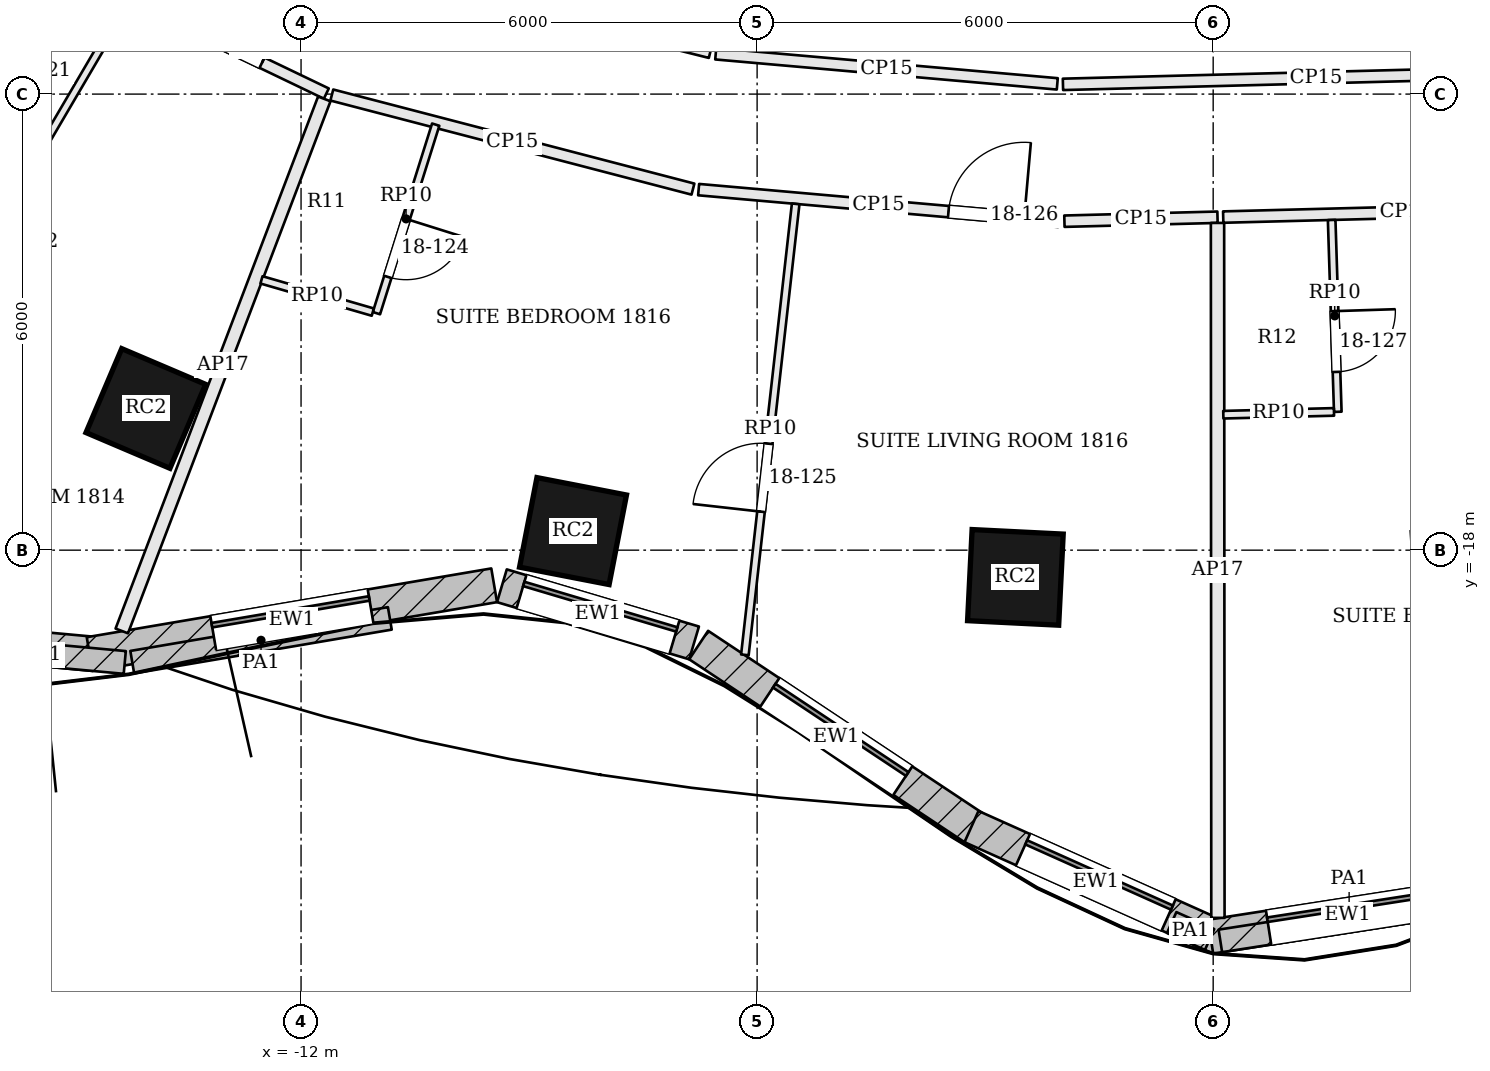
"""IFC4 building model, lengths in metres.
Left out: names, types, materials, properties, quantities, classifications, styles, units other than length and angle.
Written with IfcOpenShell. Run it as: python <this file> out.ifc"""

import sys

from ifc_helpers import new_model, si_unit, direction, frame, frame_2d, origin, origin_2d, place, context, subcontext, project, spatial, rectangle, extrude, element, fill, save


model = new_model("IFC4")
c1 = context("Model", 3, precision=1e-05, world=origin(), true_north=direction((0.0, 1.0)))
c2 = subcontext(c1, "Body", "Model", "MODEL_VIEW")
j1 = project(units=[si_unit("LENGTHUNIT", "METRE"), si_unit("PLANEANGLEUNIT", "RADIAN")], contexts=[c1])
p1 = place(None, origin())
s1 = spatial("IfcSite", under=j1, at=p1, CompositionType="ELEMENT")
p2 = place(p1, origin())
s2 = spatial("IfcBuilding", under=s1, at=p2, CompositionType="ELEMENT")
p3 = place(p2, frame((0.0, 0.0, 81.6)))
s3 = spatial("IfcBuildingStorey", under=s2, at=p3, CompositionType="ELEMENT", Elevation=81.6)
for number, where, z_axis, x_axis in (
    (1, (-14.042, -16.136, -0.7), (0.0, 0.0, 1.0), (0.92, -0.392, 0.0)),
    (2, (-8.422, -17.749, -0.7), (0.0, 0.0, 1.0), (0.982, -0.191, 0.0)),
    (3, (-2.602, -18.358, -0.7), (0.0, 0.0, 1.0), (0.999, -0.05, 0.0)),
):
    element("IfcColumn", number, at=place(p3, frame(where, z_axis=z_axis, x_axis=x_axis)), inside=s3, PredefinedType="COLUMN", context=c2, shape_type="SweptSolid", body=[
        extrude(rectangle(XDim=1.2, YDim=1.2, at=origin_2d()), origin(), (0.0, 0.0, 1.0), 4.3),
    ])
p4 = place(p3, frame((-19.159, -18.956, 0.0), z_axis=(0.0, 0.0, 1.0), x_axis=(0.995777399421, -0.091800712424, 0.0)))
e4 = element("IfcWall", 4, at=p4, inside=s3, PredefinedType="SOLIDWALL", context=c2, shape_type="SweptSolid", body=[
    extrude(rectangle(XDim=4.455, YDim=0.45, at=frame_2d((2.227, 0.0))), origin(), (0.0, 0.0, 1.0), 3.4),
])
p5 = place(p4, frame((1.177, 0.0, 0.9)))
e5 = element("IfcOpeningElement", 5, at=p5, cuts=e4, PredefinedType="OPENING", context=c2, shape_type="SweptSolid", body=[
    extrude(rectangle(XDim=2.1, YDim=2.0, at=frame_2d((1.05, 1.0))), frame((0.0, 0.235, 0.0), z_axis=(0.0, -1.0, 0.0), x_axis=(1.0, 0.0, 0.0)), (0.0, 0.0, 1.0), 0.47),
])
p6 = place(p3, frame((-14.782, -19.367, 0.0), z_axis=(0.0, 0.0, 1.0), x_axis=(0.98585584667, 0.167595493934, 0.0)))
e6 = element("IfcWall", 6, at=p6, inside=s3, PredefinedType="SOLIDWALL", context=c2, shape_type="SweptSolid", body=[
    extrude(rectangle(XDim=5.399, YDim=0.45, at=frame_2d((2.699, 0.0))), origin(), (0.0, 0.0, 1.0), 3.4),
])
p7 = place(p6, frame((1.649, 0.0, 0.9)))
e7 = element("IfcOpeningElement", 7, at=p7, cuts=e6, PredefinedType="OPENING", context=c2, shape_type="SweptSolid", body=[
    extrude(rectangle(XDim=2.1, YDim=2.0, at=frame_2d((1.05, 1.0))), frame((0.0, 0.235, 0.0), z_axis=(0.0, -1.0, 0.0), x_axis=(1.0, 0.0, 0.0)), (0.0, 0.0, 1.0), 0.47),
])
p8 = place(p3, frame((-9.357, -18.469, 0.0), z_axis=(0.0, 0.0, 1.0), x_axis=(0.958524054629, -0.285011643091, 0.0)))
e8 = element("IfcWall", 8, at=p8, inside=s3, PredefinedType="SOLIDWALL", context=c2, shape_type="SweptSolid", body=[
    extrude(rectangle(XDim=2.637, YDim=0.45, at=frame_2d((1.319, 0.0))), origin(), (0.0, 0.0, 1.0), 3.4),
])
p9 = place(p8, frame((0.269, 0.0, 0.9)))
e9 = element("IfcOpeningElement", 9, at=p9, cuts=e8, PredefinedType="OPENING", context=c2, shape_type="SweptSolid", body=[
    extrude(rectangle(XDim=2.1, YDim=2.0, at=frame_2d((1.05, 1.0))), frame((0.0, 0.235, 0.0), z_axis=(0.0, -1.0, 0.0), x_axis=(1.0, 0.0, 0.0)), (0.0, 0.0, 1.0), 0.47),
])
p10 = place(p3, frame((-6.769, -19.248, 0.0), z_axis=(0.0, 0.0, 1.0), x_axis=(0.832973379274, -0.553313066375, 0.0)))
e10 = element("IfcWall", 10, at=p10, inside=s3, PredefinedType="SOLIDWALL", context=c2, shape_type="SweptSolid", body=[
    extrude(rectangle(XDim=4.348, YDim=0.45, at=frame_2d((2.174, 0.0))), origin(), (0.0, 0.0, 1.0), 3.4),
])
p11 = place(p10, frame((1.124, 0.0, 0.9)))
e11 = element("IfcOpeningElement", 11, at=p11, cuts=e10, PredefinedType="OPENING", context=c2, shape_type="SweptSolid", body=[
    extrude(rectangle(XDim=2.1, YDim=2.0, at=frame_2d((1.05, 1.0))), frame((0.0, 0.235, 0.0), z_axis=(0.0, -1.0, 0.0), x_axis=(1.0, 0.0, 0.0)), (0.0, 0.0, 1.0), 0.47),
])
p12 = place(p3, frame((-3.179, -21.636, 0.0), z_axis=(0.0, 0.0, 1.0), x_axis=(0.912608353595, -0.40883492139, 0.0)))
e12 = element("IfcWall", 12, at=p12, inside=s3, PredefinedType="SOLIDWALL", context=c2, shape_type="SweptSolid", body=[
    extrude(rectangle(XDim=3.585, YDim=0.45, at=frame_2d((1.792, 0.0))), origin(), (0.0, 0.0, 1.0), 3.4),
])
p13 = place(p12, frame((0.742, 0.0, 0.9)))
e13 = element("IfcOpeningElement", 13, at=p13, cuts=e12, PredefinedType="OPENING", context=c2, shape_type="SweptSolid", body=[
    extrude(rectangle(XDim=2.1, YDim=2.0, at=frame_2d((1.05, 1.0))), frame((0.0, 0.235, 0.0), z_axis=(0.0, -1.0, 0.0), x_axis=(1.0, 0.0, 0.0)), (0.0, 0.0, 1.0), 0.47),
])
p14 = place(p3, frame((-0.035, -23.085, 0.0), z_axis=(0.0, 0.0, 1.0), x_axis=(0.988133637562, 0.153596596054, 0.0)))
e14 = element("IfcWall", 14, at=p14, inside=s3, PredefinedType="SOLIDWALL", context=c2, shape_type="SweptSolid", body=[
    extrude(rectangle(XDim=3.646, YDim=0.45, at=frame_2d((1.823, 0.0))), origin(), (0.0, 0.0, 1.0), 3.4),
])
p15 = place(p14, frame((0.773, 0.0, 0.9)))
e15 = element("IfcOpeningElement", 15, at=p15, cuts=e14, PredefinedType="OPENING", context=c2, shape_type="SweptSolid", body=[
    extrude(rectangle(XDim=2.1, YDim=2.0, at=frame_2d((1.05, 1.0))), frame((0.0, 0.235, 0.0), z_axis=(0.0, -1.0, 0.0), x_axis=(1.0, 0.0, 0.0)), (0.0, 0.0, 1.0), 0.47),
])
p16 = place(p3, frame((-16.462, -19.28, 3.6), z_axis=(0.0, 0.0, 1.0), x_axis=(0.995778015376, -0.091794030816, 0.0)))
e16 = element("IfcWall", 16, at=p16, inside=s3, PredefinedType="PARAPET", context=c2, shape_type="SweptSolid", body=[
    extrude(rectangle(XDim=2.152, YDim=0.3, at=frame_2d((1.076, 0.0))), origin(), (0.0, 0.0, 1.0), 1.1),
])
p17 = place(p3, frame((-14.221, -19.473, 3.6), z_axis=(0.0, 0.0, 1.0), x_axis=(0.985864880964, 0.167542342353, 0.0)))
e17 = element("IfcWall", 17, at=p17, inside=s3, PredefinedType="PARAPET", context=c2, shape_type="SweptSolid", body=[
    extrude(rectangle(XDim=3.438, YDim=0.3, at=frame_2d((1.719, 0.0))), origin(), (0.0, 0.0, 1.0), 1.1),
])
p18 = place(p3, frame((-0.545, -22.898, 3.6), z_axis=(0.0, 0.0, 1.0), x_axis=(0.912497815069, -0.409081578044, 0.0)))
e18 = element("IfcWall", 18, at=p18, inside=s3, PredefinedType="PARAPET", context=c2, shape_type="SweptSolid", body=[
    extrude(rectangle(XDim=0.546, YDim=0.3, at=frame_2d((0.273, 0.0))), origin(), (0.0, 0.0, 1.0), 1.1),
])
p19 = place(p3, frame((0.094, -23.14, 3.6), z_axis=(0.0, 0.0, 1.0), x_axis=(0.988150084887, 0.153490748056, 0.0)))
e19 = element("IfcWall", 19, at=p19, inside=s3, PredefinedType="PARAPET", context=c2, shape_type="SweptSolid", body=[
    extrude(rectangle(XDim=3.429, YDim=0.3, at=frame_2d((1.715, 0.0))), origin(), (0.0, 0.0, 1.0), 1.1),
])
p20 = place(p3, frame((-14.771, -10.503, 0.0), z_axis=(0.0, 0.0, 1.0), x_axis=(0.901503135339, -0.432772569573, 0.0)))
e20 = element("IfcWall", 20, at=p20, inside=s3, PredefinedType="PARTITIONING", context=c2, shape_type="SweptSolid", body=[
    extrude(rectangle(XDim=3.442, YDim=0.15, at=frame_2d((1.721, 0.0))), origin(), (0.0, 0.0, 1.0), 2.784),
])
p21 = place(p20, frame((1.504, 0.0, 0.0)))
e21 = element("IfcOpeningElement", 21, at=p21, cuts=e20, PredefinedType="OPENING", context=c2, shape_type="SweptSolid", body=[
    extrude(rectangle(XDim=1.0, YDim=2.1, at=frame_2d((0.5, 1.05))), frame((0.0, 0.085, 0.0), z_axis=(0.0, -1.0, 0.0), x_axis=(1.0, 0.0, 0.0)), (0.0, 0.0, 1.0), 0.17),
])
p22 = place(p3, frame((-14.359, -19.063, 0.0), z_axis=(0.0, 0.0, 1.0), x_axis=(0.355741824807, 0.934584268048, 0.0)))
e22 = element("IfcWall", 22, at=p22, inside=s3, PredefinedType="PARTITIONING", context=c2, shape_type="SweptSolid", body=[
    extrude(rectangle(XDim=7.49, YDim=0.175, at=frame_2d((3.745, 0.0))), origin(), (0.0, 0.0, 1.0), 2.784),
])
p23 = place(p3, frame((-11.595, -12.012, 0.0), z_axis=(0.0, 0.0, 1.0), x_axis=(0.967696436642, -0.252118239146, 0.0)))
e23 = element("IfcWall", 23, at=p23, inside=s3, PredefinedType="PARTITIONING", context=c2, shape_type="SweptSolid", body=[
    extrude(rectangle(XDim=4.91, YDim=0.15, at=frame_2d((2.455, 0.0))), origin(), (0.0, 0.0, 1.0), 2.784),
])
p24 = place(p3, frame((-6.77, -13.257, 0.0), z_axis=(0.0, 0.0, 1.0), x_axis=(0.996139758015, -0.08778144737, 0.0)))
e24 = element("IfcWall", 24, at=p24, inside=s3, PredefinedType="PARTITIONING", context=c2, shape_type="SweptSolid", body=[
    extrude(rectangle(XDim=4.756, YDim=0.15, at=frame_2d((2.378, 0.0))), origin(), (0.0, 0.0, 1.0), 2.784),
])
p25 = place(p24, frame((3.3, 0.0, 0.0)))
e25 = element("IfcOpeningElement", 25, at=p25, cuts=e24, PredefinedType="OPENING", context=c2, shape_type="SweptSolid", body=[
    extrude(rectangle(XDim=1.0, YDim=2.1, at=frame_2d((0.5, 1.05))), frame((0.0, 0.085, 0.0), z_axis=(0.0, -1.0, 0.0), x_axis=(1.0, 0.0, 0.0)), (0.0, 0.0, 1.0), 0.17),
])
p26 = place(p3, frame((-1.957, -13.672, 0.0), z_axis=(0.0, 0.0, 1.0), x_axis=(0.999663662109, 0.025933813031, 0.0)))
e26 = element("IfcWall", 26, at=p26, inside=s3, PredefinedType="PARTITIONING", context=c2, shape_type="SweptSolid", body=[
    extrude(rectangle(XDim=2.015, YDim=0.15, at=frame_2d((1.007, 0.0))), origin(), (0.0, 0.0, 1.0), 2.784),
])
p27 = place(p3, frame((0.062, -22.837, 0.0), z_axis=(0.0, 0.0, 1.0), x_axis=(-0.000614184887, 0.999999811388, 0.0)))
e27 = element("IfcWall", 27, at=p27, inside=s3, PredefinedType="PARTITIONING", context=c2, shape_type="SweptSolid", body=[
    extrude(rectangle(XDim=9.143, YDim=0.175, at=frame_2d((4.571, 0.0))), origin(), (0.0, 0.0, 1.0), 2.784),
])
p28 = place(p3, frame((0.132, -13.618, 0.0), z_axis=(0.0, 0.0, 1.0), x_axis=(0.999664963682, 0.025883593008, 0.0)))
e28 = element("IfcWall", 28, at=p28, inside=s3, PredefinedType="PARTITIONING", context=c2, shape_type="SweptSolid", body=[
    extrude(rectangle(XDim=4.811, YDim=0.15, at=frame_2d((2.405, 0.0))), origin(), (0.0, 0.0, 1.0), 2.784),
])
p29 = place(p3, frame((4.684, -11.699, 0.0), z_axis=(0.0, 0.0, 1.0), x_axis=(-0.999663438204, -0.025942442425, 0.0)))
e29 = element("IfcWall", 29, at=p29, inside=s3, PredefinedType="PARTITIONING", context=c2, shape_type="SweptSolid", body=[
    extrude(rectangle(XDim=6.663, YDim=0.15, at=frame_2d((3.332, 0.0))), origin(), (0.0, 0.0, 1.0), 2.784),
])
p30 = place(p3, frame((-2.051, -11.865, 0.0), z_axis=(0.0, 0.0, 1.0), x_axis=(-0.996139599493, 0.087783246245, 0.0)))
e30 = element("IfcWall", 30, at=p30, inside=s3, PredefinedType="PARTITIONING", context=c2, shape_type="SweptSolid", body=[
    extrude(rectangle(XDim=4.511, YDim=0.15, at=frame_2d((2.255, 0.0))), origin(), (0.0, 0.0, 1.0), 2.784),
])
p31 = place(p3, frame((-6.617, -11.451, 0.0), z_axis=(0.0, 0.0, 1.0), x_axis=(-0.969987441267, 0.243155020069, 0.0)))
e31 = element("IfcWall", 31, at=p31, inside=s3, PredefinedType="PARTITIONING", context=c2, shape_type="SweptSolid", body=[
    extrude(rectangle(XDim=4.359, YDim=0.15, at=frame_2d((2.179, 0.0))), origin(), (0.0, 0.0, 1.0), 2.784),
])
p32 = place(p3, frame((-18.949, -18.745, 0.0), z_axis=(0.0, 0.0, 1.0), x_axis=(0.505730402321, 0.862691578821, 0.0)))
e32 = element("IfcWall", 32, at=p32, inside=s3, PredefinedType="PARTITIONING", context=c2, shape_type="SweptSolid", body=[
    extrude(rectangle(XDim=9.195, YDim=0.1, at=frame_2d((4.597, 0.0))), origin(), (0.0, 0.0, 1.0), 2.784),
])
p33 = place(p32, frame((5.12, 0.0, 0.0)))
e33 = element("IfcOpeningElement", 33, at=p33, cuts=e32, PredefinedType="OPENING", context=c2, shape_type="SweptSolid", body=[
    extrude(rectangle(XDim=0.9, YDim=2.4, at=frame_2d((0.45, 1.2))), frame((0.0, 0.06, 0.0), z_axis=(0.0, -1.0, 0.0), x_axis=(1.0, 0.0, 0.0)), (0.0, 0.0, 1.0), 0.12),
])
p34 = place(p3, frame((-15.081, -10.366, 0.0), z_axis=(0.0, 0.0, 1.0), x_axis=(-0.557375152116, -0.830260766147, 0.0)))
e34 = element("IfcWall", 34, at=p34, inside=s3, PredefinedType="PARTITIONING", context=c2, shape_type="SweptSolid", body=[
    extrude(rectangle(XDim=2.525, YDim=0.1, at=frame_2d((1.262, 0.0))), origin(), (0.0, 0.0, 1.0), 2.784),
])
p35 = place(p34, frame((1.2, 0.0, 0.0)))
e35 = element("IfcOpeningElement", 35, at=p35, cuts=e34, PredefinedType="OPENING", context=c2, shape_type="SweptSolid", body=[
    extrude(rectangle(XDim=0.8, YDim=2.1, at=frame_2d((0.4, 1.05))), frame((0.0, 0.06, 0.0), z_axis=(0.0, -1.0, 0.0), x_axis=(1.0, 0.0, 0.0)), (0.0, 0.0, 1.0), 0.12),
])
p36 = place(p3, frame((-6.161, -19.377, 0.0), z_axis=(0.0, 0.0, 1.0), x_axis=(0.111916919639, 0.993717567067, 0.0)))
e36 = element("IfcWall", 36, at=p36, inside=s3, PredefinedType="PARTITIONING", context=c2, shape_type="SweptSolid", body=[
    extrude(rectangle(XDim=5.971, YDim=0.1, at=frame_2d((2.985, 0.0))), origin(), (0.0, 0.0, 1.0), 2.784),
])
p37 = place(p36, frame((1.896, 0.0, 0.0)))
e37 = element("IfcOpeningElement", 37, at=p37, cuts=e36, PredefinedType="OPENING", context=c2, shape_type="SweptSolid", body=[
    extrude(rectangle(XDim=0.9, YDim=2.4, at=frame_2d((0.45, 1.2))), frame((0.0, 0.06, 0.0), z_axis=(0.0, -1.0, 0.0), x_axis=(1.0, 0.0, 0.0)), (0.0, 0.0, 1.0), 0.12),
])
p38 = place(p3, frame((-10.229, -12.402, 0.0), z_axis=(0.0, 0.0, 1.0), x_axis=(-0.299899842135, -0.95397069383, 0.0)))
e38 = element("IfcWall", 38, at=p38, inside=s3, PredefinedType="PARTITIONING", context=c2, shape_type="SweptSolid", body=[
    extrude(rectangle(XDim=2.6, YDim=0.1, at=frame_2d((1.3, 0.0))), origin(), (0.0, 0.0, 1.0), 2.784),
])
p39 = place(p38, frame((1.3, 0.0, 0.0)))
e39 = element("IfcOpeningElement", 39, at=p39, cuts=e38, PredefinedType="OPENING", context=c2, shape_type="SweptSolid", body=[
    extrude(rectangle(XDim=0.8, YDim=2.1, at=frame_2d((0.4, 1.05))), frame((0.0, 0.06, 0.0), z_axis=(0.0, -1.0, 0.0), x_axis=(1.0, 0.0, 0.0)), (0.0, 0.0, 1.0), 0.12),
])
p40 = place(p3, frame((-11.056, -14.868, 0.0), z_axis=(0.0, 0.0, 1.0), x_axis=(-0.960532741446, 0.278166950966, 0.0)))
e40 = element("IfcWall", 40, at=p40, inside=s3, PredefinedType="PARTITIONING", context=c2, shape_type="SweptSolid", body=[
    extrude(rectangle(XDim=1.524, YDim=0.1, at=frame_2d((0.762, 0.0))), origin(), (0.0, 0.0, 1.0), 2.784),
])
p41 = place(p3, frame((1.559, -13.656, 0.0), z_axis=(0.0, 0.0, 1.0), x_axis=(0.031907900589, -0.999490813304, 0.0)))
e41 = element("IfcWall", 41, at=p41, inside=s3, PredefinedType="PARTITIONING", context=c2, shape_type="SweptSolid", body=[
    extrude(rectangle(XDim=2.525, YDim=0.1, at=frame_2d((1.262, 0.0))), origin(), (0.0, 0.0, 1.0), 2.784),
])
p42 = place(p41, frame((1.2, 0.0, 0.0)))
e42 = element("IfcOpeningElement", 42, at=p42, cuts=e41, PredefinedType="OPENING", context=c2, shape_type="SweptSolid", body=[
    extrude(rectangle(XDim=0.8, YDim=2.1, at=frame_2d((0.4, 1.05))), frame((0.0, 0.06, 0.0), z_axis=(0.0, -1.0, 0.0), x_axis=(1.0, 0.0, 0.0)), (0.0, 0.0, 1.0), 0.12),
])
p43 = place(p3, frame((1.589, -16.181, 0.0), z_axis=(0.0, 0.0, 1.0), x_axis=(-0.999675274808, -0.025482247488, 0.0)))
e43 = element("IfcWall", 43, at=p43, inside=s3, PredefinedType="PARTITIONING", context=c2, shape_type="SweptSolid", body=[
    extrude(rectangle(XDim=1.456, YDim=0.1, at=frame_2d((0.728, 0.0))), origin(), (0.0, 0.0, 1.0), 2.784),
])
p44 = place(p7, origin())
e44 = element("IfcWindow", 44, at=p44, inside=s3, PartitioningType="SINGLE_PANEL", PredefinedType="WINDOW", context=c2, shape_type="SweptSolid", body=[
    extrude(rectangle(XDim=2.1, YDim=2.0, at=frame_2d((1.05, 1.0))), frame((0.0, 0.135, 0.0), z_axis=(0.0, -1.0, 0.0), x_axis=(1.0, 0.0, 0.0)), (0.0, 0.0, 1.0), 0.06),
])
fill(e7, e44)
p45 = place(p9, origin())
e45 = element("IfcWindow", 45, at=p45, inside=s3, PartitioningType="SINGLE_PANEL", PredefinedType="WINDOW", context=c2, shape_type="SweptSolid", body=[
    extrude(rectangle(XDim=2.1, YDim=2.0, at=frame_2d((1.05, 1.0))), frame((0.0, 0.135, 0.0), z_axis=(0.0, -1.0, 0.0), x_axis=(1.0, 0.0, 0.0)), (0.0, 0.0, 1.0), 0.06),
])
fill(e9, e45)
p46 = place(p11, origin())
e46 = element("IfcWindow", 46, at=p46, inside=s3, PartitioningType="SINGLE_PANEL", PredefinedType="WINDOW", context=c2, shape_type="SweptSolid", body=[
    extrude(rectangle(XDim=2.1, YDim=2.0, at=frame_2d((1.05, 1.0))), frame((0.0, 0.135, 0.0), z_axis=(0.0, -1.0, 0.0), x_axis=(1.0, 0.0, 0.0)), (0.0, 0.0, 1.0), 0.06),
])
fill(e11, e46)
p47 = place(p13, origin())
e47 = element("IfcWindow", 47, at=p47, inside=s3, PartitioningType="SINGLE_PANEL", PredefinedType="WINDOW", context=c2, shape_type="SweptSolid", body=[
    extrude(rectangle(XDim=2.1, YDim=2.0, at=frame_2d((1.05, 1.0))), frame((0.0, 0.135, 0.0), z_axis=(0.0, -1.0, 0.0), x_axis=(1.0, 0.0, 0.0)), (0.0, 0.0, 1.0), 0.06),
])
fill(e13, e47)
p48 = place(p15, origin())
e48 = element("IfcWindow", 48, at=p48, inside=s3, PartitioningType="SINGLE_PANEL", PredefinedType="WINDOW", context=c2, shape_type="SweptSolid", body=[
    extrude(rectangle(XDim=2.1, YDim=2.0, at=frame_2d((1.05, 1.0))), frame((0.0, 0.135, 0.0), z_axis=(0.0, -1.0, 0.0), x_axis=(1.0, 0.0, 0.0)), (0.0, 0.0, 1.0), 0.06),
])
fill(e15, e48)
p49 = place(p21, origin())
e49 = element("IfcDoor", 49, at=p49, inside=s3, OperationType="SINGLE_SWING_RIGHT", PredefinedType="DOOR", context=c2, shape_type="SweptSolid", body=[
    extrude(rectangle(XDim=1.0, YDim=2.1, at=frame_2d((0.5, 1.05))), frame((0.0, 0.025, 0.0), z_axis=(0.0, -1.0, 0.0), x_axis=(1.0, 0.0, 0.0)), (0.0, 0.0, 1.0), 0.05),
])
fill(e21, e49)
p50 = place(p39, origin())
e50 = element("IfcDoor", 50, at=p50, inside=s3, OperationType="SINGLE_SWING_LEFT", PredefinedType="DOOR", context=c2, shape_type="SweptSolid", body=[
    extrude(rectangle(XDim=0.8, YDim=2.1, at=frame_2d((0.4, 1.05))), frame((0.0, 0.025, 0.0), z_axis=(0.0, -1.0, 0.0), x_axis=(1.0, 0.0, 0.0)), (0.0, 0.0, 1.0), 0.05),
])
fill(e39, e50)
p51 = place(p37, origin())
e51 = element("IfcDoor", 51, at=p51, inside=s3, OperationType="SINGLE_SWING_LEFT", PredefinedType="DOOR", context=c2, shape_type="SweptSolid", body=[
    extrude(rectangle(XDim=0.9, YDim=2.4, at=frame_2d((0.45, 1.2))), frame((0.0, 0.025, 0.0), z_axis=(0.0, -1.0, 0.0), x_axis=(1.0, 0.0, 0.0)), (0.0, 0.0, 1.0), 0.05),
])
fill(e37, e51)
p52 = place(p25, origin())
e52 = element("IfcDoor", 52, at=p52, inside=s3, OperationType="SINGLE_SWING_RIGHT", PredefinedType="DOOR", context=c2, shape_type="SweptSolid", body=[
    extrude(rectangle(XDim=1.0, YDim=2.1, at=frame_2d((0.5, 1.05))), frame((0.0, 0.025, 0.0), z_axis=(0.0, -1.0, 0.0), x_axis=(1.0, 0.0, 0.0)), (0.0, 0.0, 1.0), 0.05),
])
fill(e25, e52)
p53 = place(p42, origin())
e53 = element("IfcDoor", 53, at=p53, inside=s3, OperationType="SINGLE_SWING_LEFT", PredefinedType="DOOR", context=c2, shape_type="SweptSolid", body=[
    extrude(rectangle(XDim=0.8, YDim=2.1, at=frame_2d((0.4, 1.05))), frame((0.0, 0.025, 0.0), z_axis=(0.0, -1.0, 0.0), x_axis=(1.0, 0.0, 0.0)), (0.0, 0.0, 1.0), 0.05),
])
fill(e42, e53)
save(model, sys.argv[1])
